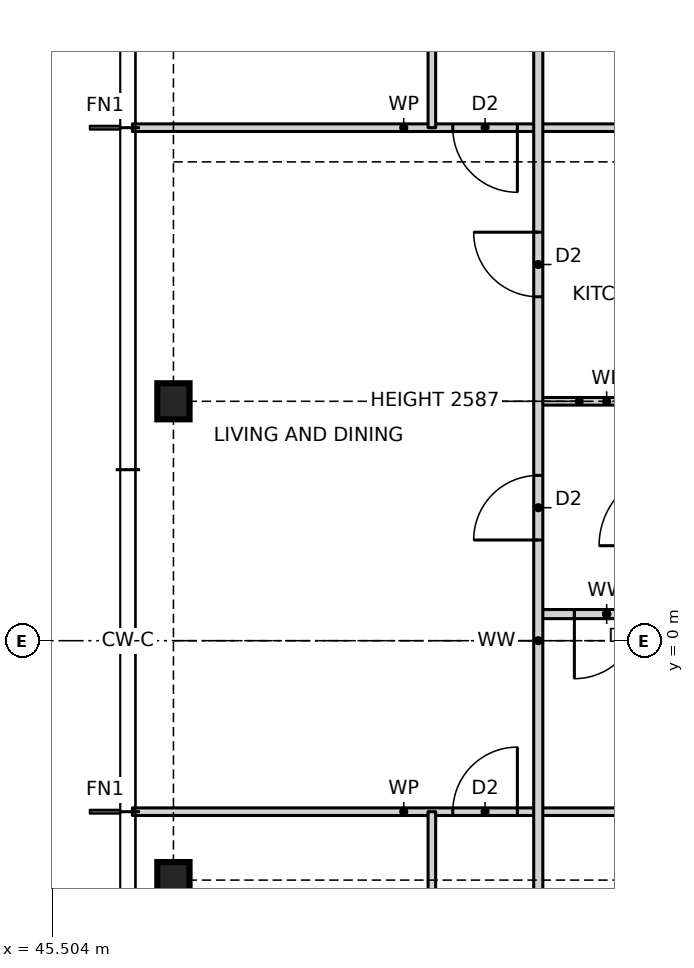
"""IFC4 building model, lengths in metres.
Left out: names, types, materials, properties, quantities, classifications, styles, units other than length and angle.
Written with IfcOpenShell. Run it as: python <this file> out.ifc"""

import sys

from ifc_helpers import new_model, si_unit, direction, frame, frame_2d, origin, origin_2d, place, context, subcontext, project, spatial, rectangle, i_section, extrude, element, fill, save


model = new_model("IFC4")
c1 = context("Model", 3, precision=1e-05, world=origin(), true_north=direction((0.0, 1.0)))
c2 = subcontext(c1, "Body", "Model", "MODEL_VIEW")
j1 = project(units=[si_unit("LENGTHUNIT", "METRE"), si_unit("PLANEANGLEUNIT", "RADIAN")], contexts=[c1])
p1 = place(None, origin())
s1 = spatial("IfcSite", under=j1, at=p1, CompositionType="ELEMENT")
p2 = place(p1, origin())
s2 = spatial("IfcBuilding", under=s1, at=p2, CompositionType="ELEMENT")
p3 = place(p2, frame((0.0, 0.0, 43.0)))
s3 = spatial("IfcBuildingStorey", under=s2, at=p3, CompositionType="ELEMENT", Elevation=43.0)
for number, where, z_axis, x_axis in (
    (1, (47.1, 3.15, 0.0), (0.0, 0.0, 1.0), (1.0, 0.0, 0.0)),
    (2, (47.1, -3.15, 0.0), (0.0, 0.0, 1.0), (1.0, 0.0, 0.0)),
):
    element("IfcColumn", number, at=place(p3, frame(where, z_axis=z_axis, x_axis=x_axis)), inside=s3, PredefinedType="COLUMN", context=c2, shape_type="SweptSolid", body=[
        extrude(i_section(OverallWidth=0.424, OverallDepth=0.475, WebThickness=0.048, FlangeThickness=0.077, at=origin_2d()), origin(), (0.0, 0.0, 1.0), 3.5),
    ])
p4 = place(p3, frame((46.56, -2.25, 0.0), z_axis=(0.0, 0.0, 1.0), x_axis=(1.0, 0.0, 0.0)))
e3 = element("IfcWall", 3, at=p4, inside=s3, PredefinedType="PARTITIONING", context=c2, shape_type="SweptSolid", body=[
    extrude(rectangle(XDim=7.14, YDim=0.1, at=frame_2d((3.57, 0.0))), origin(), (0.0, 0.0, 1.0), 3.27),
])
p5 = place(p4, frame((4.215, 0.0, 0.0)))
e4 = element("IfcOpeningElement", 4, at=p5, cuts=e3, PredefinedType="OPENING", context=c2, shape_type="SweptSolid", body=[
    extrude(rectangle(XDim=0.85, YDim=2.1, at=frame_2d((0.425, 1.05))), frame((0.0, 0.06, 0.0), z_axis=(0.0, -1.0, 0.0), x_axis=(1.0, 0.0, 0.0)), (0.0, 0.0, 1.0), 0.12),
])
p6 = place(p3, frame((51.9, 0.35, 0.0), z_axis=(0.0, 0.0, 1.0), x_axis=(1.0, 0.0, 0.0)))
e5 = element("IfcWall", 5, at=p6, inside=s3, PredefinedType="PARTITIONING", context=c2, shape_type="SweptSolid", body=[
    extrude(rectangle(XDim=1.8, YDim=0.12, at=frame_2d((0.9, 0.0))), origin(), (0.0, 0.0, 1.0), 3.27),
])
p7 = place(p6, frame((0.475, 0.0, 0.0)))
e6 = element("IfcOpeningElement", 6, at=p7, cuts=e5, PredefinedType="OPENING", context=c2, shape_type="SweptSolid", body=[
    extrude(rectangle(XDim=0.85, YDim=2.1, at=frame_2d((0.425, 1.05))), frame((0.0, 0.07, 0.0), z_axis=(0.0, -1.0, 0.0), x_axis=(1.0, 0.0, 0.0)), (0.0, 0.0, 1.0), 0.14),
])
p8 = place(p3, frame((51.9, 3.15, 0.0), z_axis=(0.0, 0.0, 1.0), x_axis=(1.0, 0.0, 0.0)))
e7 = element("IfcWall", 7, at=p8, inside=s3, PredefinedType="PARTITIONING", context=c2, shape_type="SweptSolid", body=[
    extrude(rectangle(XDim=1.8, YDim=0.1, at=frame_2d((0.9, 0.0))), origin(), (0.0, 0.0, 1.0), 2.587),
])
p9 = place(p3, frame((46.56, 6.75, 0.0), z_axis=(0.0, 0.0, 1.0), x_axis=(1.0, 0.0, 0.0)))
e8 = element("IfcWall", 8, at=p9, inside=s3, PredefinedType="PARTITIONING", context=c2, shape_type="SweptSolid", body=[
    extrude(rectangle(XDim=7.14, YDim=0.1, at=frame_2d((3.57, 0.0))), origin(), (0.0, 0.0, 1.0), 3.27),
])
p10 = place(p9, frame((4.215, 0.0, 0.0)))
e9 = element("IfcOpeningElement", 9, at=p10, cuts=e8, PredefinedType="OPENING", context=c2, shape_type="SweptSolid", body=[
    extrude(rectangle(XDim=0.85, YDim=2.1, at=frame_2d((0.425, 1.05))), frame((0.0, 0.06, 0.0), z_axis=(0.0, -1.0, 0.0), x_axis=(1.0, 0.0, 0.0)), (0.0, 0.0, 1.0), 0.12),
])
p11 = place(p3, frame((51.9, -12.614, 0.0), z_axis=(0.0, 0.0, 1.0), x_axis=(0.0, 1.0, 0.0)))
e10 = element("IfcWall", 10, at=p11, inside=s3, PredefinedType="PARTITIONING", context=c2, shape_type="SweptSolid", body=[
    extrude(rectangle(XDim=25.228, YDim=0.12, at=frame_2d((12.614, 0.0))), origin(), (0.0, 0.0, 1.0), 3.27),
])
p12 = place(p11, frame((17.139, 0.0, 0.0)))
e11 = element("IfcOpeningElement", 11, at=p12, cuts=e10, PredefinedType="OPENING", context=c2, shape_type="SweptSolid", body=[
    extrude(rectangle(XDim=0.85, YDim=2.1, at=frame_2d((0.425, 1.05))), frame((0.0, 0.07, 0.0), z_axis=(0.0, -1.0, 0.0), x_axis=(1.0, 0.0, 0.0)), (0.0, 0.0, 1.0), 0.14),
])
p13 = place(p11, frame((13.939, 0.0, 0.0)))
e12 = element("IfcOpeningElement", 12, at=p13, cuts=e10, PredefinedType="OPENING", context=c2, shape_type="SweptSolid", body=[
    extrude(rectangle(XDim=0.85, YDim=2.1, at=frame_2d((0.425, 1.05))), frame((0.0, 0.07, 0.0), z_axis=(0.0, -1.0, 0.0), x_axis=(1.0, 0.0, 0.0)), (0.0, 0.0, 1.0), 0.14),
])
p14 = place(p11, frame((21.871, 0.0, 0.0)))
e13 = element("IfcOpeningElement", 13, at=p14, cuts=e10, PredefinedType="OPENING", context=c2, shape_type="SweptSolid", body=[
    extrude(rectangle(XDim=0.85, YDim=2.1, at=frame_2d((0.425, 1.05))), frame((0.0, 0.07, 0.0), z_axis=(0.0, -1.0, 0.0), x_axis=(1.0, 0.0, 0.0)), (0.0, 0.0, 1.0), 0.14),
])
p15 = place(p11, frame((7.739, 0.0, 0.0)))
e14 = element("IfcOpeningElement", 14, at=p15, cuts=e10, PredefinedType="OPENING", context=c2, shape_type="SweptSolid", body=[
    extrude(rectangle(XDim=0.85, YDim=2.1, at=frame_2d((0.425, 1.05))), frame((0.0, 0.07, 0.0), z_axis=(0.0, -1.0, 0.0), x_axis=(1.0, 0.0, 0.0)), (0.0, 0.0, 1.0), 0.14),
])
p16 = place(p11, frame((2.557, 0.0, 0.0)))
e15 = element("IfcOpeningElement", 15, at=p16, cuts=e10, PredefinedType="OPENING", context=c2, shape_type="SweptSolid", body=[
    extrude(rectangle(XDim=0.85, YDim=2.1, at=frame_2d((0.425, 1.05))), frame((0.0, 0.07, 0.0), z_axis=(0.0, -1.0, 0.0), x_axis=(1.0, 0.0, 0.0)), (0.0, 0.0, 1.0), 0.14),
])
p17 = place(p3, frame((50.5, -13.45, 0.0), z_axis=(0.0, 0.0, 1.0), x_axis=(0.0, 1.0, 0.0)))
e16 = element("IfcWall", 16, at=p17, inside=s3, PredefinedType="PARTITIONING", context=c2, shape_type="SweptSolid", body=[
    extrude(rectangle(XDim=11.2, YDim=0.1, at=frame_2d((5.6, 0.0))), origin(), (0.0, 0.0, 1.0), 3.27),
])
p18 = place(p17, frame((8.525, 0.0, 0.0)))
e17 = element("IfcOpeningElement", 17, at=p18, cuts=e16, PredefinedType="OPENING", context=c2, shape_type="SweptSolid", body=[
    extrude(rectangle(XDim=0.85, YDim=2.1, at=frame_2d((0.425, 1.05))), frame((0.0, 0.06, 0.0), z_axis=(0.0, -1.0, 0.0), x_axis=(1.0, 0.0, 0.0)), (0.0, 0.0, 1.0), 0.12),
])
p19 = place(p17, frame((4.025, 0.0, 0.0)))
e18 = element("IfcOpeningElement", 18, at=p19, cuts=e16, PredefinedType="OPENING", context=c2, shape_type="SweptSolid", body=[
    extrude(rectangle(XDim=0.85, YDim=2.1, at=frame_2d((0.425, 1.05))), frame((0.0, 0.06, 0.0), z_axis=(0.0, -1.0, 0.0), x_axis=(1.0, 0.0, 0.0)), (0.0, 0.0, 1.0), 0.12),
])
p20 = place(p17, frame((0.675, 0.0, 0.0)))
e19 = element("IfcOpeningElement", 19, at=p20, cuts=e16, PredefinedType="OPENING", context=c2, shape_type="SweptSolid", body=[
    extrude(rectangle(XDim=0.85, YDim=2.1, at=frame_2d((0.425, 1.05))), frame((0.0, 0.06, 0.0), z_axis=(0.0, -1.0, 0.0), x_axis=(1.0, 0.0, 0.0)), (0.0, 0.0, 1.0), 0.12),
])
p21 = place(p3, frame((50.5, 6.75, 0.0), z_axis=(0.0, 0.0, 1.0), x_axis=(0.0, 1.0, 0.0)))
e20 = element("IfcWall", 20, at=p21, inside=s3, PredefinedType="PARTITIONING", context=c2, shape_type="SweptSolid", body=[
    extrude(rectangle(XDim=6.7, YDim=0.1, at=frame_2d((3.35, 0.0))), origin(), (0.0, 0.0, 1.0), 3.27),
])
p22 = place(p21, frame((1.825, 0.0, 0.0)))
e21 = element("IfcOpeningElement", 21, at=p22, cuts=e20, PredefinedType="OPENING", context=c2, shape_type="SweptSolid", body=[
    extrude(rectangle(XDim=0.85, YDim=2.1, at=frame_2d((0.425, 1.05))), frame((0.0, 0.06, 0.0), z_axis=(0.0, -1.0, 0.0), x_axis=(1.0, 0.0, 0.0)), (0.0, 0.0, 1.0), 0.12),
])
p23 = place(p21, frame((5.175, 0.0, 0.0)))
e22 = element("IfcOpeningElement", 22, at=p23, cuts=e20, PredefinedType="OPENING", context=c2, shape_type="SweptSolid", body=[
    extrude(rectangle(XDim=0.85, YDim=2.1, at=frame_2d((0.425, 1.05))), frame((0.0, 0.06, 0.0), z_axis=(0.0, -1.0, 0.0), x_axis=(1.0, 0.0, 0.0)), (0.0, 0.0, 1.0), 0.12),
])
p24 = place(p12, origin())
e23 = element("IfcDoor", 23, at=p24, inside=s3, OperationType="SINGLE_SWING_RIGHT", PredefinedType="DOOR", context=c2, shape_type="SweptSolid", body=[
    extrude(rectangle(XDim=0.85, YDim=2.1, at=frame_2d((0.425, 1.05))), frame((0.0, 0.025, 0.0), z_axis=(0.0, -1.0, 0.0), x_axis=(1.0, 0.0, 0.0)), (0.0, 0.0, 1.0), 0.05),
])
fill(e11, e23)
p25 = place(p13, origin())
e24 = element("IfcDoor", 24, at=p25, inside=s3, OperationType="SINGLE_SWING_LEFT", PredefinedType="DOOR", context=c2, shape_type="SweptSolid", body=[
    extrude(rectangle(XDim=0.85, YDim=2.1, at=frame_2d((0.425, 1.05))), frame((0.0, 0.025, 0.0), z_axis=(0.0, -1.0, 0.0), x_axis=(1.0, 0.0, 0.0)), (0.0, 0.0, 1.0), 0.05),
])
fill(e12, e24)
p26 = place(p7, frame((0.85, 0.0, 0.0), z_axis=(0.0, 0.0, 1.0), x_axis=(-1.0, 0.0, 0.0)))
e25 = element("IfcDoor", 25, at=p26, inside=s3, OperationType="SINGLE_SWING_RIGHT", PredefinedType="DOOR", context=c2, shape_type="SweptSolid", body=[
    extrude(rectangle(XDim=0.85, YDim=2.1, at=frame_2d((0.425, 1.05))), frame((0.0, 0.025, 0.0), z_axis=(0.0, -1.0, 0.0), x_axis=(1.0, 0.0, 0.0)), (0.0, 0.0, 1.0), 0.05),
])
fill(e6, e25)
p27 = place(p10, frame((0.85, 0.0, 0.0), z_axis=(0.0, 0.0, 1.0), x_axis=(-1.0, 0.0, 0.0)))
e26 = element("IfcDoor", 26, at=p27, inside=s3, OperationType="SINGLE_SWING_LEFT", PredefinedType="DOOR", context=c2, shape_type="SweptSolid", body=[
    extrude(rectangle(XDim=0.85, YDim=2.1, at=frame_2d((0.425, 1.05))), frame((0.0, 0.025, 0.0), z_axis=(0.0, -1.0, 0.0), x_axis=(1.0, 0.0, 0.0)), (0.0, 0.0, 1.0), 0.05),
])
fill(e9, e26)
p28 = place(p5, origin())
e27 = element("IfcDoor", 27, at=p28, inside=s3, OperationType="SINGLE_SWING_RIGHT", PredefinedType="DOOR", context=c2, shape_type="SweptSolid", body=[
    extrude(rectangle(XDim=0.85, YDim=2.1, at=frame_2d((0.425, 1.05))), frame((0.0, 0.025, 0.0), z_axis=(0.0, -1.0, 0.0), x_axis=(1.0, 0.0, 0.0)), (0.0, 0.0, 1.0), 0.05),
])
fill(e4, e27)
save(model, sys.argv[1])
